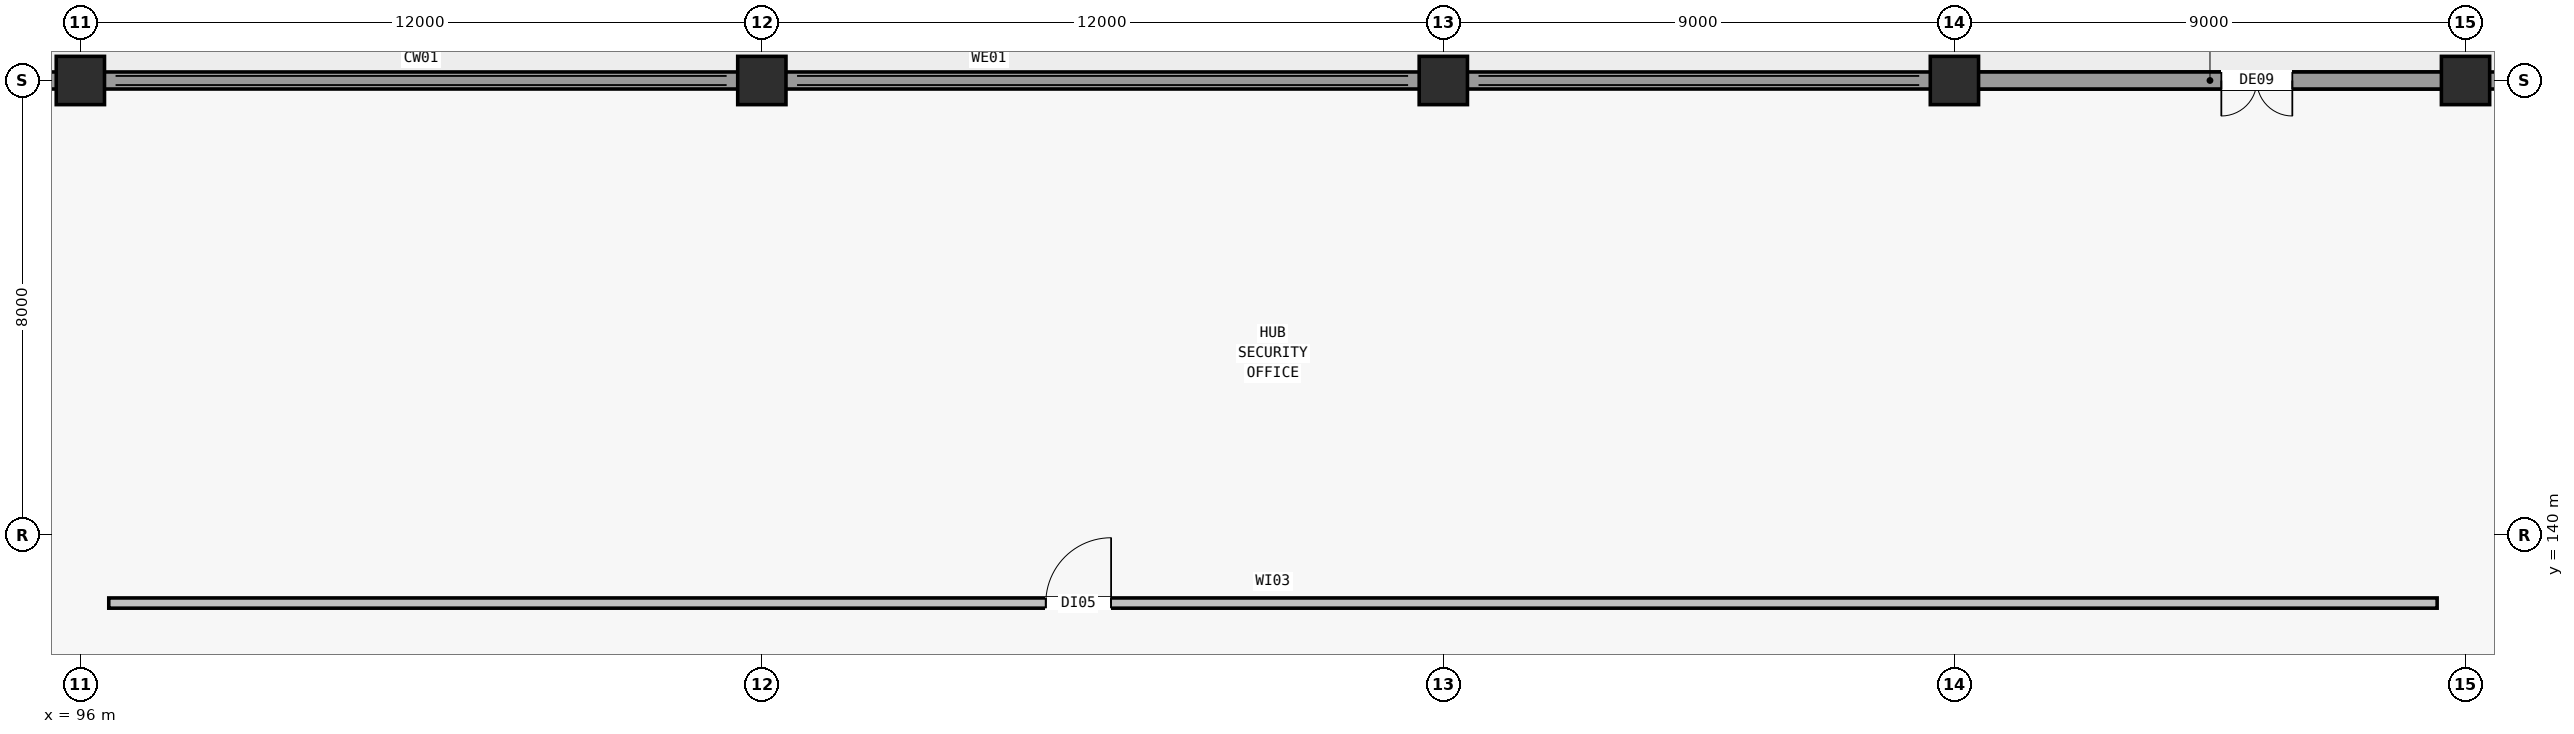
"""IFC4 building model, lengths in metres.
Left out: names, types, materials, properties, quantities, classifications, styles, units other than length and angle.
Written with IfcOpenShell. Run it as: python <this file> out.ifc"""

import sys

from ifc_helpers import new_model, si_unit, direction, frame, frame_2d, origin, origin_2d, place, context, subcontext, project, spatial, rectangle, extrude, element, fill, save


model = new_model("IFC4")
c1 = context("Model", 3, precision=1e-05, world=origin(), true_north=direction((0.0, 1.0)))
c2 = subcontext(c1, "Body", "Model", "MODEL_VIEW")
j1 = project(units=[si_unit("LENGTHUNIT", "METRE"), si_unit("PLANEANGLEUNIT", "RADIAN")], contexts=[c1])
p1 = place(None, origin())
s1 = spatial("IfcSite", under=j1, at=p1, CompositionType="ELEMENT")
p2 = place(p1, origin())
s2 = spatial("IfcBuilding", under=s1, at=p2, CompositionType="ELEMENT")
p3 = place(p2, origin())
s3 = spatial("IfcBuildingStorey", under=s2, at=p3, CompositionType="ELEMENT", Elevation=0.0)
for number, where, z_axis, x_axis in (
    (1, (96.0, 148.0, -0.9), (0.0, 0.0, 1.0), (1.0, 0.0, 0.0)),
    (2, (108.0, 148.0, -0.9), (0.0, 0.0, 1.0), (1.0, 0.0, 0.0)),
    (3, (120.0, 148.0, -0.9), (0.0, 0.0, 1.0), (1.0, 0.0, 0.0)),
    (4, (129.0, 148.0, -0.9), (0.0, 0.0, 1.0), (1.0, 0.0, 0.0)),
    (5, (138.0, 148.0, -0.9), (0.0, 0.0, 1.0), (1.0, 0.0, 0.0)),
):
    element("IfcColumn", number, at=place(p3, frame(where, z_axis=z_axis, x_axis=x_axis)), inside=s3, PredefinedType="COLUMN", context=c2, shape_type="SweptSolid", body=[
        extrude(rectangle(XDim=0.85, YDim=0.85, at=origin_2d()), origin(), (0.0, 0.0, 1.0), 6.5),
    ])
p4 = place(p3, frame((22.0, 148.0, -0.9), z_axis=(0.0, 0.0, 1.0), x_axis=(1.0, 0.0, 0.0)))
e6 = element("IfcWall", 6, at=p4, inside=s3, PredefinedType="STANDARD", context=c2, shape_type="SweptSolid", body=[
    extrude(rectangle(XDim=188.0, YDim=0.3, at=frame_2d((94.0, 0.0))), origin(), (0.0, 0.0, 1.0), 0.9),
])
p5 = place(p3, frame((137.595, 148.0, 0.0), z_axis=(0.0, 0.0, 1.0), x_axis=(-1.0, 0.0, 0.0)))
e7 = element("IfcWall", 7, at=p5, inside=s3, PredefinedType="STANDARD", context=c2, shape_type="SweptSolid", body=[
    extrude(rectangle(XDim=8.19, YDim=0.3, at=frame_2d((4.095, 0.0))), origin(), (0.0, 0.0, 1.0), 4.2),
])
p6 = place(p5, frame((2.645, 0.0, 0.0)))
e8 = element("IfcOpeningElement", 8, at=p6, cuts=e7, PredefinedType="OPENING", context=c2, shape_type="SweptSolid", body=[
    extrude(rectangle(XDim=1.25, YDim=2.25, at=frame_2d((0.625, 1.125))), frame((0.0, 0.16, 0.0), z_axis=(0.0, -1.0, 0.0), x_axis=(1.0, 0.0, 0.0)), (0.0, 0.0, 1.0), 0.32),
])
p7 = place(p3, frame((96.5, 138.8, 0.0), z_axis=(0.0, 0.0, 1.0), x_axis=(1.0, 0.0, 0.0)))
e9 = element("IfcWall", 9, at=p7, inside=s3, PredefinedType="PARTITIONING", context=c2, shape_type="SweptSolid", body=[
    extrude(rectangle(XDim=41.0, YDim=0.18, at=frame_2d((20.5, 0.0))), origin(), (0.0, 0.0, 1.0), 4.2),
])
p8 = place(p7, frame((16.5, 0.0, 0.0)))
e10 = element("IfcOpeningElement", 10, at=p8, cuts=e9, PredefinedType="OPENING", context=c2, shape_type="SweptSolid", body=[
    extrude(rectangle(XDim=1.15, YDim=2.15, at=frame_2d((0.575, 1.075))), frame((0.0, 0.1, 0.0), z_axis=(0.0, -1.0, 0.0), x_axis=(1.0, 0.0, 0.0)), (0.0, 0.0, 1.0), 0.2),
])
p9 = place(p6, origin())
e11 = element("IfcDoor", 11, at=p9, inside=s3, OperationType="DOUBLE_SWING_LEFT", PredefinedType="DOOR", context=c2, shape_type="SweptSolid", body=[
    extrude(rectangle(XDim=1.25, YDim=2.25, at=frame_2d((0.625, 1.125))), frame((0.0, 0.025, 0.0), z_axis=(0.0, -1.0, 0.0), x_axis=(1.0, 0.0, 0.0)), (0.0, 0.0, 1.0), 0.05),
])
fill(e8, e11)
p10 = place(p8, origin())
e12 = element("IfcDoor", 12, at=p10, inside=s3, OperationType="SINGLE_SWING_RIGHT", PredefinedType="DOOR", context=c2, shape_type="SweptSolid", body=[
    extrude(rectangle(XDim=1.15, YDim=2.15, at=frame_2d((0.575, 1.075))), frame((0.0, 0.025, 0.0), z_axis=(0.0, -1.0, 0.0), x_axis=(1.0, 0.0, 0.0)), (0.0, 0.0, 1.0), 0.05),
])
fill(e10, e12)
save(model, sys.argv[1])
